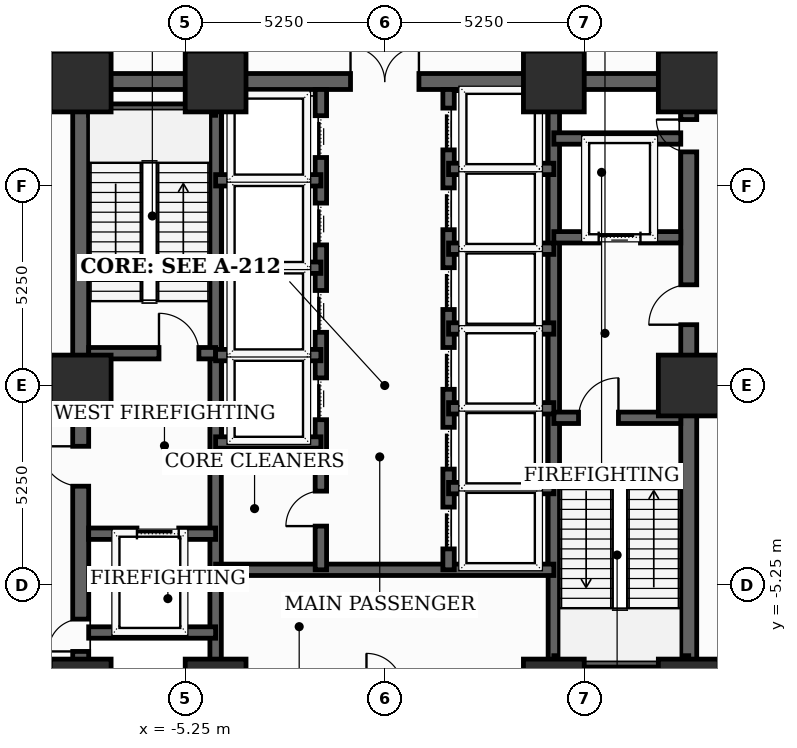
"""IFC4 building model, lengths in metres.
Left out: names, types, materials, properties, quantities, classifications, styles, units other than length and angle.
Written with IfcOpenShell. Run it as: python <this file> out.ifc"""

import sys

from ifc_helpers import new_model, si_unit, direction, frame, frame_2d, origin, origin_2d, place, context, subcontext, project, spatial, rectangle, extrude, element, fill, save


model = new_model("IFC4")
c1 = context("Model", 3, precision=1e-05, world=origin(), true_north=direction((0.0, 1.0)))
c2 = subcontext(c1, "Body", "Model", "MODEL_VIEW")
j1 = project(units=[si_unit("LENGTHUNIT", "METRE"), si_unit("PLANEANGLEUNIT", "RADIAN")], contexts=[c1])
p1 = place(None, origin())
s1 = spatial("IfcSite", under=j1, at=p1, CompositionType="ELEMENT")
p2 = place(p1, origin())
s2 = spatial("IfcBuilding", under=s1, at=p2, CompositionType="ELEMENT")
p3 = place(p2, frame((0.0, 0.0, 5.2)))
s3 = spatial("IfcBuildingStorey", under=s2, at=p3, CompositionType="ELEMENT", Elevation=5.2)
for number, where, z_axis, x_axis in (
    (1, (-8.0, -8.0, 0.0), (0.0, 0.0, 1.0), (1.0, 0.0, 0.0)),
    (2, (-4.45, -8.0, 0.0), (0.0, 0.0, 1.0), (1.0, 0.0, 0.0)),
    (3, (4.45, -8.0, 0.0), (0.0, 0.0, 1.0), (1.0, 0.0, 0.0)),
    (4, (8.0, -8.0, 0.0), (0.0, 0.0, 1.0), (1.0, 0.0, 0.0)),
    (5, (8.0, 0.0, 0.0), (0.0, 0.0, 1.0), (1.0, 0.0, 0.0)),
    (6, (8.0, 8.0, 0.0), (0.0, 0.0, 1.0), (1.0, 0.0, 0.0)),
    (7, (4.45, 8.0, 0.0), (0.0, 0.0, 1.0), (1.0, 0.0, 0.0)),
    (8, (-4.45, 8.0, 0.0), (0.0, 0.0, 1.0), (1.0, 0.0, 0.0)),
    (9, (-8.0, 8.0, 0.0), (0.0, 0.0, 1.0), (1.0, 0.0, 0.0)),
    (10, (-8.0, 0.0, 0.0), (0.0, 0.0, 1.0), (1.0, 0.0, 0.0)),
):
    element("IfcColumn", number, at=place(p3, frame(where, z_axis=z_axis, x_axis=x_axis)), inside=s3, PredefinedType="COLUMN", context=c2, shape_type="SweptSolid", body=[
        extrude(rectangle(XDim=1.6, YDim=1.6, at=origin_2d()), origin(), (0.0, 0.0, 1.0), 5.2),
    ])
p4 = place(p3, frame((-8.0, -8.0, 0.0), z_axis=(0.0, 0.0, 1.0), x_axis=(0.0, 1.0, 0.0)))
e11 = element("IfcWall", 11, at=p4, inside=s3, PredefinedType="SHEAR", context=c2, shape_type="SweptSolid", body=[
    extrude(rectangle(XDim=16.0, YDim=0.42, at=frame_2d((8.0, 0.0))), origin(), (0.0, 0.0, 1.0), 4.95),
])
p5 = place(p4, frame((1.002, 0.0, 0.0)))
e12 = element("IfcOpeningElement", 12, at=p5, cuts=e11, PredefinedType="OPENING", context=c2, shape_type="SweptSolid", body=[
    extrude(rectangle(XDim=0.85, YDim=2.02, at=frame_2d((0.425, 1.01))), frame((0.0, 0.22, 0.0), z_axis=(0.0, -1.0, 0.0), x_axis=(1.0, 0.0, 0.0)), (0.0, 0.0, 1.0), 0.44),
])
p6 = place(p4, frame((5.35, 0.0, 0.0)))
e13 = element("IfcOpeningElement", 13, at=p6, cuts=e11, PredefinedType="OPENING", context=c2, shape_type="SweptSolid", body=[
    extrude(rectangle(XDim=1.05, YDim=2.15, at=frame_2d((0.525, 1.075))), frame((0.0, 0.22, 0.0), z_axis=(0.0, -1.0, 0.0), x_axis=(1.0, 0.0, 0.0)), (0.0, 0.0, 1.0), 0.44),
])
p7 = place(p3, frame((8.0, -8.0, 0.0), z_axis=(0.0, 0.0, 1.0), x_axis=(0.0, 1.0, 0.0)))
e14 = element("IfcWall", 14, at=p7, inside=s3, PredefinedType="SHEAR", context=c2, shape_type="SweptSolid", body=[
    extrude(rectangle(XDim=16.0, YDim=0.42, at=frame_2d((8.0, 0.0))), origin(), (0.0, 0.0, 1.0), 4.95),
])
p8 = place(p7, frame((9.6, 0.0, 0.0)))
e15 = element("IfcOpeningElement", 15, at=p8, cuts=e14, PredefinedType="OPENING", context=c2, shape_type="SweptSolid", body=[
    extrude(rectangle(XDim=1.05, YDim=2.15, at=frame_2d((0.525, 1.075))), frame((0.0, 0.22, 0.0), z_axis=(0.0, -1.0, 0.0), x_axis=(1.0, 0.0, 0.0)), (0.0, 0.0, 1.0), 0.44),
])
p9 = place(p7, frame((14.148, 0.0, 0.0)))
e16 = element("IfcOpeningElement", 16, at=p9, cuts=e14, PredefinedType="OPENING", context=c2, shape_type="SweptSolid", body=[
    extrude(rectangle(XDim=0.85, YDim=2.02, at=frame_2d((0.425, 1.01))), frame((0.0, 0.22, 0.0), z_axis=(0.0, -1.0, 0.0), x_axis=(1.0, 0.0, 0.0)), (0.0, 0.0, 1.0), 0.44),
])
p10 = place(p3, frame((-8.0, 8.0, 0.0), z_axis=(0.0, 0.0, 1.0), x_axis=(1.0, 0.0, 0.0)))
e17 = element("IfcWall", 17, at=p10, inside=s3, PredefinedType="SHEAR", context=c2, shape_type="SweptSolid", body=[
    extrude(rectangle(XDim=16.0, YDim=0.42, at=frame_2d((8.0, 0.0))), origin(), (0.0, 0.0, 1.0), 4.95),
])
p11 = place(p10, frame((7.1, 0.0, 0.0)))
e18 = element("IfcOpeningElement", 18, at=p11, cuts=e17, PredefinedType="OPENING", context=c2, shape_type="SweptSolid", body=[
    extrude(rectangle(XDim=1.8, YDim=2.15, at=frame_2d((0.9, 1.075))), frame((0.0, 0.22, 0.0), z_axis=(0.0, -1.0, 0.0), x_axis=(1.0, 0.0, 0.0)), (0.0, 0.0, 1.0), 0.44),
])
for number, where, z_axis, x_axis in (
    (19, (-4.45, -7.79, 0.0), (0.0, 0.0, 1.0), (0.0, 1.0, 0.0)),
    (20, (4.45, -7.79, 0.0), (0.0, 0.0, 1.0), (0.0, 1.0, 0.0)),
):
    element("IfcWall", number, at=place(p3, frame(where, z_axis=z_axis, x_axis=x_axis)), inside=s3, PredefinedType="SHEAR", context=c2, shape_type="SweptSolid", body=[
        extrude(rectangle(XDim=15.58, YDim=0.3, at=frame_2d((7.79, 0.0))), origin(), (0.0, 0.0, 1.0), 4.95),
    ])
p12 = place(p3, frame((-7.79, 0.85, 0.0), z_axis=(0.0, 0.0, 1.0), x_axis=(1.0, 0.0, 0.0)))
e21 = element("IfcWall", 21, at=p12, inside=s3, PredefinedType="SHEAR", context=c2, shape_type="SweptSolid", body=[
    extrude(rectangle(XDim=3.34, YDim=0.3, at=frame_2d((1.67, 0.0))), origin(), (0.0, 0.0, 1.0), 4.95),
])
p13 = place(p12, frame((1.85, 0.0, 0.0)))
e22 = element("IfcOpeningElement", 22, at=p13, cuts=e21, PredefinedType="OPENING", context=c2, shape_type="SweptSolid", body=[
    extrude(rectangle(XDim=1.05, YDim=2.15, at=frame_2d((0.525, 1.075))), frame((0.0, 0.16, 0.0), z_axis=(0.0, -1.0, 0.0), x_axis=(1.0, 0.0, 0.0)), (0.0, 0.0, 1.0), 0.32),
])
p14 = place(p3, frame((-7.79, 7.26, 0.0), z_axis=(0.0, 0.0, 1.0), x_axis=(1.0, 0.0, 0.0)))
e23 = element("IfcWall", 23, at=p14, inside=s3, PredefinedType="SHEAR", context=c2, shape_type="SweptSolid", body=[
    extrude(rectangle(XDim=3.34, YDim=0.3, at=frame_2d((1.67, 0.0))), origin(), (0.0, 0.0, 1.0), 4.95),
])
p15 = place(p3, frame((4.45, -0.85, 0.0), z_axis=(0.0, 0.0, 1.0), x_axis=(1.0, 0.0, 0.0)))
e24 = element("IfcWall", 24, at=p15, inside=s3, PredefinedType="SHEAR", context=c2, shape_type="SweptSolid", body=[
    extrude(rectangle(XDim=3.34, YDim=0.3, at=frame_2d((1.67, 0.0))), origin(), (0.0, 0.0, 1.0), 4.95),
])
p16 = place(p15, frame((0.65, 0.0, 0.0)))
e25 = element("IfcOpeningElement", 25, at=p16, cuts=e24, PredefinedType="OPENING", context=c2, shape_type="SweptSolid", body=[
    extrude(rectangle(XDim=1.05, YDim=2.15, at=frame_2d((0.525, 1.075))), frame((0.0, 0.16, 0.0), z_axis=(0.0, -1.0, 0.0), x_axis=(1.0, 0.0, 0.0)), (0.0, 0.0, 1.0), 0.32),
])
p17 = place(p3, frame((4.45, -7.26, 0.0), z_axis=(0.0, 0.0, 1.0), x_axis=(1.0, 0.0, 0.0)))
e26 = element("IfcWall", 26, at=p17, inside=s3, PredefinedType="SHEAR", context=c2, shape_type="SweptSolid", body=[
    extrude(rectangle(XDim=3.55, YDim=0.3, at=frame_2d((1.775, 0.0))), origin(), (0.0, 0.0, 1.0), 4.95),
])
p18 = place(p3, frame((-7.79, -3.9, 0.0), z_axis=(0.0, 0.0, 1.0), x_axis=(1.0, 0.0, 0.0)))
e27 = element("IfcWall", 27, at=p18, inside=s3, PredefinedType="SHEAR", context=c2, shape_type="SweptSolid", body=[
    extrude(rectangle(XDim=3.34, YDim=0.3, at=frame_2d((1.67, 0.0))), origin(), (0.0, 0.0, 1.0), 4.95),
])
p19 = place(p18, frame((1.27, 0.0, 0.0)))
e28 = element("IfcOpeningElement", 28, at=p19, cuts=e27, PredefinedType="OPENING", context=c2, shape_type="SweptSolid", body=[
    extrude(rectangle(XDim=1.1, YDim=2.1, at=frame_2d((0.55, 1.05))), frame((0.0, 0.16, 0.0), z_axis=(0.0, -1.0, 0.0), x_axis=(1.0, 0.0, 0.0)), (0.0, 0.0, 1.0), 0.32),
])
p20 = place(p3, frame((-7.79, -6.5, 0.0), z_axis=(0.0, 0.0, 1.0), x_axis=(1.0, 0.0, 0.0)))
e29 = element("IfcWall", 29, at=p20, inside=s3, PredefinedType="SHEAR", context=c2, shape_type="SweptSolid", body=[
    extrude(rectangle(XDim=3.34, YDim=0.3, at=frame_2d((1.67, 0.0))), origin(), (0.0, 0.0, 1.0), 4.95),
])
p21 = place(p3, frame((4.45, 3.9, 0.0), z_axis=(0.0, 0.0, 1.0), x_axis=(1.0, 0.0, 0.0)))
e30 = element("IfcWall", 30, at=p21, inside=s3, PredefinedType="SHEAR", context=c2, shape_type="SweptSolid", body=[
    extrude(rectangle(XDim=3.34, YDim=0.3, at=frame_2d((1.67, 0.0))), origin(), (0.0, 0.0, 1.0), 4.95),
])
p22 = place(p21, frame((1.18, 0.0, 0.0)))
e31 = element("IfcOpeningElement", 31, at=p22, cuts=e30, PredefinedType="OPENING", context=c2, shape_type="SweptSolid", body=[
    extrude(rectangle(XDim=1.1, YDim=2.1, at=frame_2d((0.55, 1.05))), frame((0.0, 0.16, 0.0), z_axis=(0.0, -1.0, 0.0), x_axis=(1.0, 0.0, 0.0)), (0.0, 0.0, 1.0), 0.32),
])
p23 = place(p3, frame((4.45, 6.5, 0.0), z_axis=(0.0, 0.0, 1.0), x_axis=(1.0, 0.0, 0.0)))
e32 = element("IfcWall", 32, at=p23, inside=s3, PredefinedType="SHEAR", context=c2, shape_type="SweptSolid", body=[
    extrude(rectangle(XDim=3.34, YDim=0.3, at=frame_2d((1.67, 0.0))), origin(), (0.0, 0.0, 1.0), 4.95),
])
p24 = place(p3, frame((-4.45, -4.85, 0.0), z_axis=(0.0, 0.0, 1.0), x_axis=(1.0, 0.0, 0.0)))
e33 = element("IfcWall", 33, at=p24, inside=s3, PredefinedType="SHEAR", context=c2, shape_type="SweptSolid", body=[
    extrude(rectangle(XDim=8.9, YDim=0.3, at=frame_2d((4.45, 0.0))), origin(), (0.0, 0.0, 1.0), 4.95),
])
p25 = place(p3, frame((-1.68, -4.85, 0.0), z_axis=(0.0, 0.0, 1.0), x_axis=(0.0, 1.0, 0.0)))
e34 = element("IfcWall", 34, at=p25, inside=s3, PredefinedType="SHEAR", context=c2, shape_type="SweptSolid", body=[
    extrude(rectangle(XDim=12.64, YDim=0.3, at=frame_2d((6.32, 0.0))), origin(), (0.0, 0.0, 1.0), 4.95),
])
p26 = place(p25, frame((3.95, 0.0, 0.0)))
e35 = element("IfcOpeningElement", 35, at=p26, cuts=e34, PredefinedType="OPENING", context=c2, shape_type="SweptSolid", body=[
    extrude(rectangle(XDim=1.1, YDim=2.1, at=frame_2d((0.55, 1.05))), frame((0.0, 0.16, 0.0), z_axis=(0.0, -1.0, 0.0), x_axis=(1.0, 0.0, 0.0)), (0.0, 0.0, 1.0), 0.32),
])
p27 = place(p25, frame((6.25, 0.0, 0.0)))
e36 = element("IfcOpeningElement", 36, at=p27, cuts=e34, PredefinedType="OPENING", context=c2, shape_type="SweptSolid", body=[
    extrude(rectangle(XDim=1.1, YDim=2.1, at=frame_2d((0.55, 1.05))), frame((0.0, 0.16, 0.0), z_axis=(0.0, -1.0, 0.0), x_axis=(1.0, 0.0, 0.0)), (0.0, 0.0, 1.0), 0.32),
])
p28 = place(p25, frame((8.55, 0.0, 0.0)))
e37 = element("IfcOpeningElement", 37, at=p28, cuts=e34, PredefinedType="OPENING", context=c2, shape_type="SweptSolid", body=[
    extrude(rectangle(XDim=1.1, YDim=2.1, at=frame_2d((0.55, 1.05))), frame((0.0, 0.16, 0.0), z_axis=(0.0, -1.0, 0.0), x_axis=(1.0, 0.0, 0.0)), (0.0, 0.0, 1.0), 0.32),
])
p29 = place(p25, frame((10.85, 0.0, 0.0)))
e38 = element("IfcOpeningElement", 38, at=p29, cuts=e34, PredefinedType="OPENING", context=c2, shape_type="SweptSolid", body=[
    extrude(rectangle(XDim=1.1, YDim=2.1, at=frame_2d((0.55, 1.05))), frame((0.0, 0.16, 0.0), z_axis=(0.0, -1.0, 0.0), x_axis=(1.0, 0.0, 0.0)), (0.0, 0.0, 1.0), 0.32),
])
p30 = place(p25, frame((1.15, 0.0, 0.0)))
e39 = element("IfcOpeningElement", 39, at=p30, cuts=e34, PredefinedType="OPENING", context=c2, shape_type="SweptSolid", body=[
    extrude(rectangle(XDim=0.92, YDim=2.1, at=frame_2d((0.46, 1.05))), frame((0.0, 0.16, 0.0), z_axis=(0.0, -1.0, 0.0), x_axis=(1.0, 0.0, 0.0)), (0.0, 0.0, 1.0), 0.32),
])
p31 = place(p3, frame((1.68, -4.85, 0.0), z_axis=(0.0, 0.0, 1.0), x_axis=(0.0, 1.0, 0.0)))
e40 = element("IfcWall", 40, at=p31, inside=s3, PredefinedType="SHEAR", context=c2, shape_type="SweptSolid", body=[
    extrude(rectangle(XDim=12.64, YDim=0.3, at=frame_2d((6.32, 0.0))), origin(), (0.0, 0.0, 1.0), 4.95),
])
p32 = place(p31, frame((0.55, 0.0, 0.0)))
e41 = element("IfcOpeningElement", 41, at=p32, cuts=e40, PredefinedType="OPENING", context=c2, shape_type="SweptSolid", body=[
    extrude(rectangle(XDim=1.1, YDim=2.1, at=frame_2d((0.55, 1.05))), frame((0.0, 0.16, 0.0), z_axis=(0.0, -1.0, 0.0), x_axis=(1.0, 0.0, 0.0)), (0.0, 0.0, 1.0), 0.32),
])
p33 = place(p31, frame((2.65, 0.0, 0.0)))
e42 = element("IfcOpeningElement", 42, at=p33, cuts=e40, PredefinedType="OPENING", context=c2, shape_type="SweptSolid", body=[
    extrude(rectangle(XDim=1.1, YDim=2.1, at=frame_2d((0.55, 1.05))), frame((0.0, 0.16, 0.0), z_axis=(0.0, -1.0, 0.0), x_axis=(1.0, 0.0, 0.0)), (0.0, 0.0, 1.0), 0.32),
])
p34 = place(p31, frame((4.75, 0.0, 0.0)))
e43 = element("IfcOpeningElement", 43, at=p34, cuts=e40, PredefinedType="OPENING", context=c2, shape_type="SweptSolid", body=[
    extrude(rectangle(XDim=1.1, YDim=2.1, at=frame_2d((0.55, 1.05))), frame((0.0, 0.16, 0.0), z_axis=(0.0, -1.0, 0.0), x_axis=(1.0, 0.0, 0.0)), (0.0, 0.0, 1.0), 0.32),
])
p35 = place(p31, frame((6.85, 0.0, 0.0)))
e44 = element("IfcOpeningElement", 44, at=p35, cuts=e40, PredefinedType="OPENING", context=c2, shape_type="SweptSolid", body=[
    extrude(rectangle(XDim=1.1, YDim=2.1, at=frame_2d((0.55, 1.05))), frame((0.0, 0.16, 0.0), z_axis=(0.0, -1.0, 0.0), x_axis=(1.0, 0.0, 0.0)), (0.0, 0.0, 1.0), 0.32),
])
p36 = place(p31, frame((8.95, 0.0, 0.0)))
e45 = element("IfcOpeningElement", 45, at=p36, cuts=e40, PredefinedType="OPENING", context=c2, shape_type="SweptSolid", body=[
    extrude(rectangle(XDim=1.1, YDim=2.1, at=frame_2d((0.55, 1.05))), frame((0.0, 0.16, 0.0), z_axis=(0.0, -1.0, 0.0), x_axis=(1.0, 0.0, 0.0)), (0.0, 0.0, 1.0), 0.32),
])
p37 = place(p31, frame((11.05, 0.0, 0.0)))
e46 = element("IfcOpeningElement", 46, at=p37, cuts=e40, PredefinedType="OPENING", context=c2, shape_type="SweptSolid", body=[
    extrude(rectangle(XDim=1.1, YDim=2.1, at=frame_2d((0.55, 1.05))), frame((0.0, 0.16, 0.0), z_axis=(0.0, -1.0, 0.0), x_axis=(1.0, 0.0, 0.0)), (0.0, 0.0, 1.0), 0.32),
])
for number, where, z_axis, x_axis in (
    (47, (-4.45, -1.5, 0.0), (0.0, 0.0, 1.0), (1.0, 0.0, 0.0)),
    (48, (-4.45, 0.8, 0.0), (0.0, 0.0, 1.0), (1.0, 0.0, 0.0)),
    (49, (-4.45, 3.1, 0.0), (0.0, 0.0, 1.0), (1.0, 0.0, 0.0)),
    (50, (-4.45, 5.4, 0.0), (0.0, 0.0, 1.0), (1.0, 0.0, 0.0)),
    (51, (1.68, 1.5, 0.0), (0.0, 0.0, 1.0), (1.0, 0.0, 0.0)),
    (52, (1.68, 3.6, 0.0), (0.0, 0.0, 1.0), (1.0, 0.0, 0.0)),
    (53, (1.68, 5.7, 0.0), (0.0, 0.0, 1.0), (1.0, 0.0, 0.0)),
    (54, (1.68, -2.7, 0.0), (0.0, 0.0, 1.0), (1.0, 0.0, 0.0)),
    (55, (1.68, -0.6, 0.0), (0.0, 0.0, 1.0), (1.0, 0.0, 0.0)),
):
    element("IfcWall", number, at=place(p3, frame(where, z_axis=z_axis, x_axis=x_axis)), inside=s3, PredefinedType="SHEAR", context=c2, shape_type="SweptSolid", body=[
        extrude(rectangle(XDim=2.77, YDim=0.3, at=frame_2d((1.385, 0.0))), origin(), (0.0, 0.0, 1.0), 4.95),
    ])
p38 = place(p5, origin())
e56 = element("IfcDoor", 56, at=p38, inside=s3, OperationType="SINGLE_SWING_LEFT", PredefinedType="TRAPDOOR", context=c2, shape_type="SweptSolid", body=[
    extrude(rectangle(XDim=0.85, YDim=2.02, at=frame_2d((0.425, 1.01))), frame((0.0, 0.025, 0.0), z_axis=(0.0, -1.0, 0.0), x_axis=(1.0, 0.0, 0.0)), (0.0, 0.0, 1.0), 0.05),
])
fill(e12, e56)
p39 = place(p6, origin())
e57 = element("IfcDoor", 57, at=p39, inside=s3, OperationType="SINGLE_SWING_RIGHT", PredefinedType="DOOR", context=c2, shape_type="SweptSolid", body=[
    extrude(rectangle(XDim=1.05, YDim=2.15, at=frame_2d((0.525, 1.075))), frame((0.0, 0.025, 0.0), z_axis=(0.0, -1.0, 0.0), x_axis=(1.0, 0.0, 0.0)), (0.0, 0.0, 1.0), 0.05),
])
fill(e13, e57)
p40 = place(p8, origin())
e58 = element("IfcDoor", 58, at=p40, inside=s3, OperationType="SINGLE_SWING_LEFT", PredefinedType="DOOR", context=c2, shape_type="SweptSolid", body=[
    extrude(rectangle(XDim=1.05, YDim=2.15, at=frame_2d((0.525, 1.075))), frame((0.0, 0.025, 0.0), z_axis=(0.0, -1.0, 0.0), x_axis=(1.0, 0.0, 0.0)), (0.0, 0.0, 1.0), 0.05),
])
fill(e15, e58)
p41 = place(p9, origin())
e59 = element("IfcDoor", 59, at=p41, inside=s3, OperationType="SINGLE_SWING_RIGHT", PredefinedType="TRAPDOOR", context=c2, shape_type="SweptSolid", body=[
    extrude(rectangle(XDim=0.85, YDim=2.02, at=frame_2d((0.425, 1.01))), frame((0.0, 0.025, 0.0), z_axis=(0.0, -1.0, 0.0), x_axis=(1.0, 0.0, 0.0)), (0.0, 0.0, 1.0), 0.05),
])
fill(e16, e59)
p42 = place(p11, origin())
e60 = element("IfcDoor", 60, at=p42, inside=s3, OperationType="DOUBLE_DOOR_SINGLE_SWING", PredefinedType="DOOR", context=c2, shape_type="SweptSolid", body=[
    extrude(rectangle(XDim=1.8, YDim=2.15, at=frame_2d((0.9, 1.075))), frame((0.0, 0.025, 0.0), z_axis=(0.0, -1.0, 0.0), x_axis=(1.0, 0.0, 0.0)), (0.0, 0.0, 1.0), 0.05),
])
fill(e18, e60)
p43 = place(p13, origin())
e61 = element("IfcDoor", 61, at=p43, inside=s3, OperationType="SINGLE_SWING_LEFT", PredefinedType="DOOR", context=c2, shape_type="SweptSolid", body=[
    extrude(rectangle(XDim=1.05, YDim=2.15, at=frame_2d((0.525, 1.075))), frame((0.0, 0.025, 0.0), z_axis=(0.0, -1.0, 0.0), x_axis=(1.0, 0.0, 0.0)), (0.0, 0.0, 1.0), 0.05),
])
fill(e22, e61)
p44 = place(p16, origin())
e62 = element("IfcDoor", 62, at=p44, inside=s3, OperationType="SINGLE_SWING_RIGHT", PredefinedType="DOOR", context=c2, shape_type="SweptSolid", body=[
    extrude(rectangle(XDim=1.05, YDim=2.15, at=frame_2d((0.525, 1.075))), frame((0.0, 0.025, 0.0), z_axis=(0.0, -1.0, 0.0), x_axis=(1.0, 0.0, 0.0)), (0.0, 0.0, 1.0), 0.05),
])
fill(e25, e62)
p45 = place(p19, origin())
e63 = element("IfcDoor", 63, at=p45, inside=s3, OperationType="SLIDING_TO_LEFT", PredefinedType="DOOR", context=c2, shape_type="SweptSolid", body=[
    extrude(rectangle(XDim=1.1, YDim=2.1, at=frame_2d((0.55, 1.05))), frame((0.0, 0.025, 0.0), z_axis=(0.0, -1.0, 0.0), x_axis=(1.0, 0.0, 0.0)), (0.0, 0.0, 1.0), 0.05),
])
fill(e28, e63)
p46 = place(p22, origin())
e64 = element("IfcDoor", 64, at=p46, inside=s3, OperationType="SLIDING_TO_LEFT", PredefinedType="DOOR", context=c2, shape_type="SweptSolid", body=[
    extrude(rectangle(XDim=1.1, YDim=2.1, at=frame_2d((0.55, 1.05))), frame((0.0, 0.025, 0.0), z_axis=(0.0, -1.0, 0.0), x_axis=(1.0, 0.0, 0.0)), (0.0, 0.0, 1.0), 0.05),
])
fill(e31, e64)
p47 = place(p26, origin())
e65 = element("IfcDoor", 65, at=p47, inside=s3, OperationType="SLIDING_TO_LEFT", PredefinedType="DOOR", context=c2, shape_type="SweptSolid", body=[
    extrude(rectangle(XDim=1.1, YDim=2.1, at=frame_2d((0.55, 1.05))), frame((0.0, 0.025, 0.0), z_axis=(0.0, -1.0, 0.0), x_axis=(1.0, 0.0, 0.0)), (0.0, 0.0, 1.0), 0.05),
])
fill(e35, e65)
p48 = place(p27, origin())
e66 = element("IfcDoor", 66, at=p48, inside=s3, OperationType="SLIDING_TO_LEFT", PredefinedType="DOOR", context=c2, shape_type="SweptSolid", body=[
    extrude(rectangle(XDim=1.1, YDim=2.1, at=frame_2d((0.55, 1.05))), frame((0.0, 0.025, 0.0), z_axis=(0.0, -1.0, 0.0), x_axis=(1.0, 0.0, 0.0)), (0.0, 0.0, 1.0), 0.05),
])
fill(e36, e66)
p49 = place(p28, origin())
e67 = element("IfcDoor", 67, at=p49, inside=s3, OperationType="SLIDING_TO_LEFT", PredefinedType="DOOR", context=c2, shape_type="SweptSolid", body=[
    extrude(rectangle(XDim=1.1, YDim=2.1, at=frame_2d((0.55, 1.05))), frame((0.0, 0.025, 0.0), z_axis=(0.0, -1.0, 0.0), x_axis=(1.0, 0.0, 0.0)), (0.0, 0.0, 1.0), 0.05),
])
fill(e37, e67)
p50 = place(p29, origin())
e68 = element("IfcDoor", 68, at=p50, inside=s3, OperationType="SLIDING_TO_LEFT", PredefinedType="DOOR", context=c2, shape_type="SweptSolid", body=[
    extrude(rectangle(XDim=1.1, YDim=2.1, at=frame_2d((0.55, 1.05))), frame((0.0, 0.025, 0.0), z_axis=(0.0, -1.0, 0.0), x_axis=(1.0, 0.0, 0.0)), (0.0, 0.0, 1.0), 0.05),
])
fill(e38, e68)
p51 = place(p30, origin())
e69 = element("IfcDoor", 69, at=p51, inside=s3, OperationType="SINGLE_SWING_LEFT", PredefinedType="DOOR", context=c2, shape_type="SweptSolid", body=[
    extrude(rectangle(XDim=0.92, YDim=2.1, at=frame_2d((0.46, 1.05))), frame((0.0, 0.025, 0.0), z_axis=(0.0, -1.0, 0.0), x_axis=(1.0, 0.0, 0.0)), (0.0, 0.0, 1.0), 0.05),
])
fill(e39, e69)
p52 = place(p32, origin())
e70 = element("IfcDoor", 70, at=p52, inside=s3, OperationType="SLIDING_TO_LEFT", PredefinedType="DOOR", context=c2, shape_type="SweptSolid", body=[
    extrude(rectangle(XDim=1.1, YDim=2.1, at=frame_2d((0.55, 1.05))), frame((0.0, 0.025, 0.0), z_axis=(0.0, -1.0, 0.0), x_axis=(1.0, 0.0, 0.0)), (0.0, 0.0, 1.0), 0.05),
])
fill(e41, e70)
p53 = place(p33, origin())
e71 = element("IfcDoor", 71, at=p53, inside=s3, OperationType="SLIDING_TO_LEFT", PredefinedType="DOOR", context=c2, shape_type="SweptSolid", body=[
    extrude(rectangle(XDim=1.1, YDim=2.1, at=frame_2d((0.55, 1.05))), frame((0.0, 0.025, 0.0), z_axis=(0.0, -1.0, 0.0), x_axis=(1.0, 0.0, 0.0)), (0.0, 0.0, 1.0), 0.05),
])
fill(e42, e71)
p54 = place(p34, origin())
e72 = element("IfcDoor", 72, at=p54, inside=s3, OperationType="SLIDING_TO_LEFT", PredefinedType="DOOR", context=c2, shape_type="SweptSolid", body=[
    extrude(rectangle(XDim=1.1, YDim=2.1, at=frame_2d((0.55, 1.05))), frame((0.0, 0.025, 0.0), z_axis=(0.0, -1.0, 0.0), x_axis=(1.0, 0.0, 0.0)), (0.0, 0.0, 1.0), 0.05),
])
fill(e43, e72)
p55 = place(p35, origin())
e73 = element("IfcDoor", 73, at=p55, inside=s3, OperationType="SLIDING_TO_LEFT", PredefinedType="DOOR", context=c2, shape_type="SweptSolid", body=[
    extrude(rectangle(XDim=1.1, YDim=2.1, at=frame_2d((0.55, 1.05))), frame((0.0, 0.025, 0.0), z_axis=(0.0, -1.0, 0.0), x_axis=(1.0, 0.0, 0.0)), (0.0, 0.0, 1.0), 0.05),
])
fill(e44, e73)
p56 = place(p36, origin())
e74 = element("IfcDoor", 74, at=p56, inside=s3, OperationType="SLIDING_TO_LEFT", PredefinedType="DOOR", context=c2, shape_type="SweptSolid", body=[
    extrude(rectangle(XDim=1.1, YDim=2.1, at=frame_2d((0.55, 1.05))), frame((0.0, 0.025, 0.0), z_axis=(0.0, -1.0, 0.0), x_axis=(1.0, 0.0, 0.0)), (0.0, 0.0, 1.0), 0.05),
])
fill(e45, e74)
p57 = place(p37, origin())
e75 = element("IfcDoor", 75, at=p57, inside=s3, OperationType="SLIDING_TO_LEFT", PredefinedType="DOOR", context=c2, shape_type="SweptSolid", body=[
    extrude(rectangle(XDim=1.1, YDim=2.1, at=frame_2d((0.55, 1.05))), frame((0.0, 0.025, 0.0), z_axis=(0.0, -1.0, 0.0), x_axis=(1.0, 0.0, 0.0)), (0.0, 0.0, 1.0), 0.05),
])
fill(e46, e75)
save(model, sys.argv[1])
